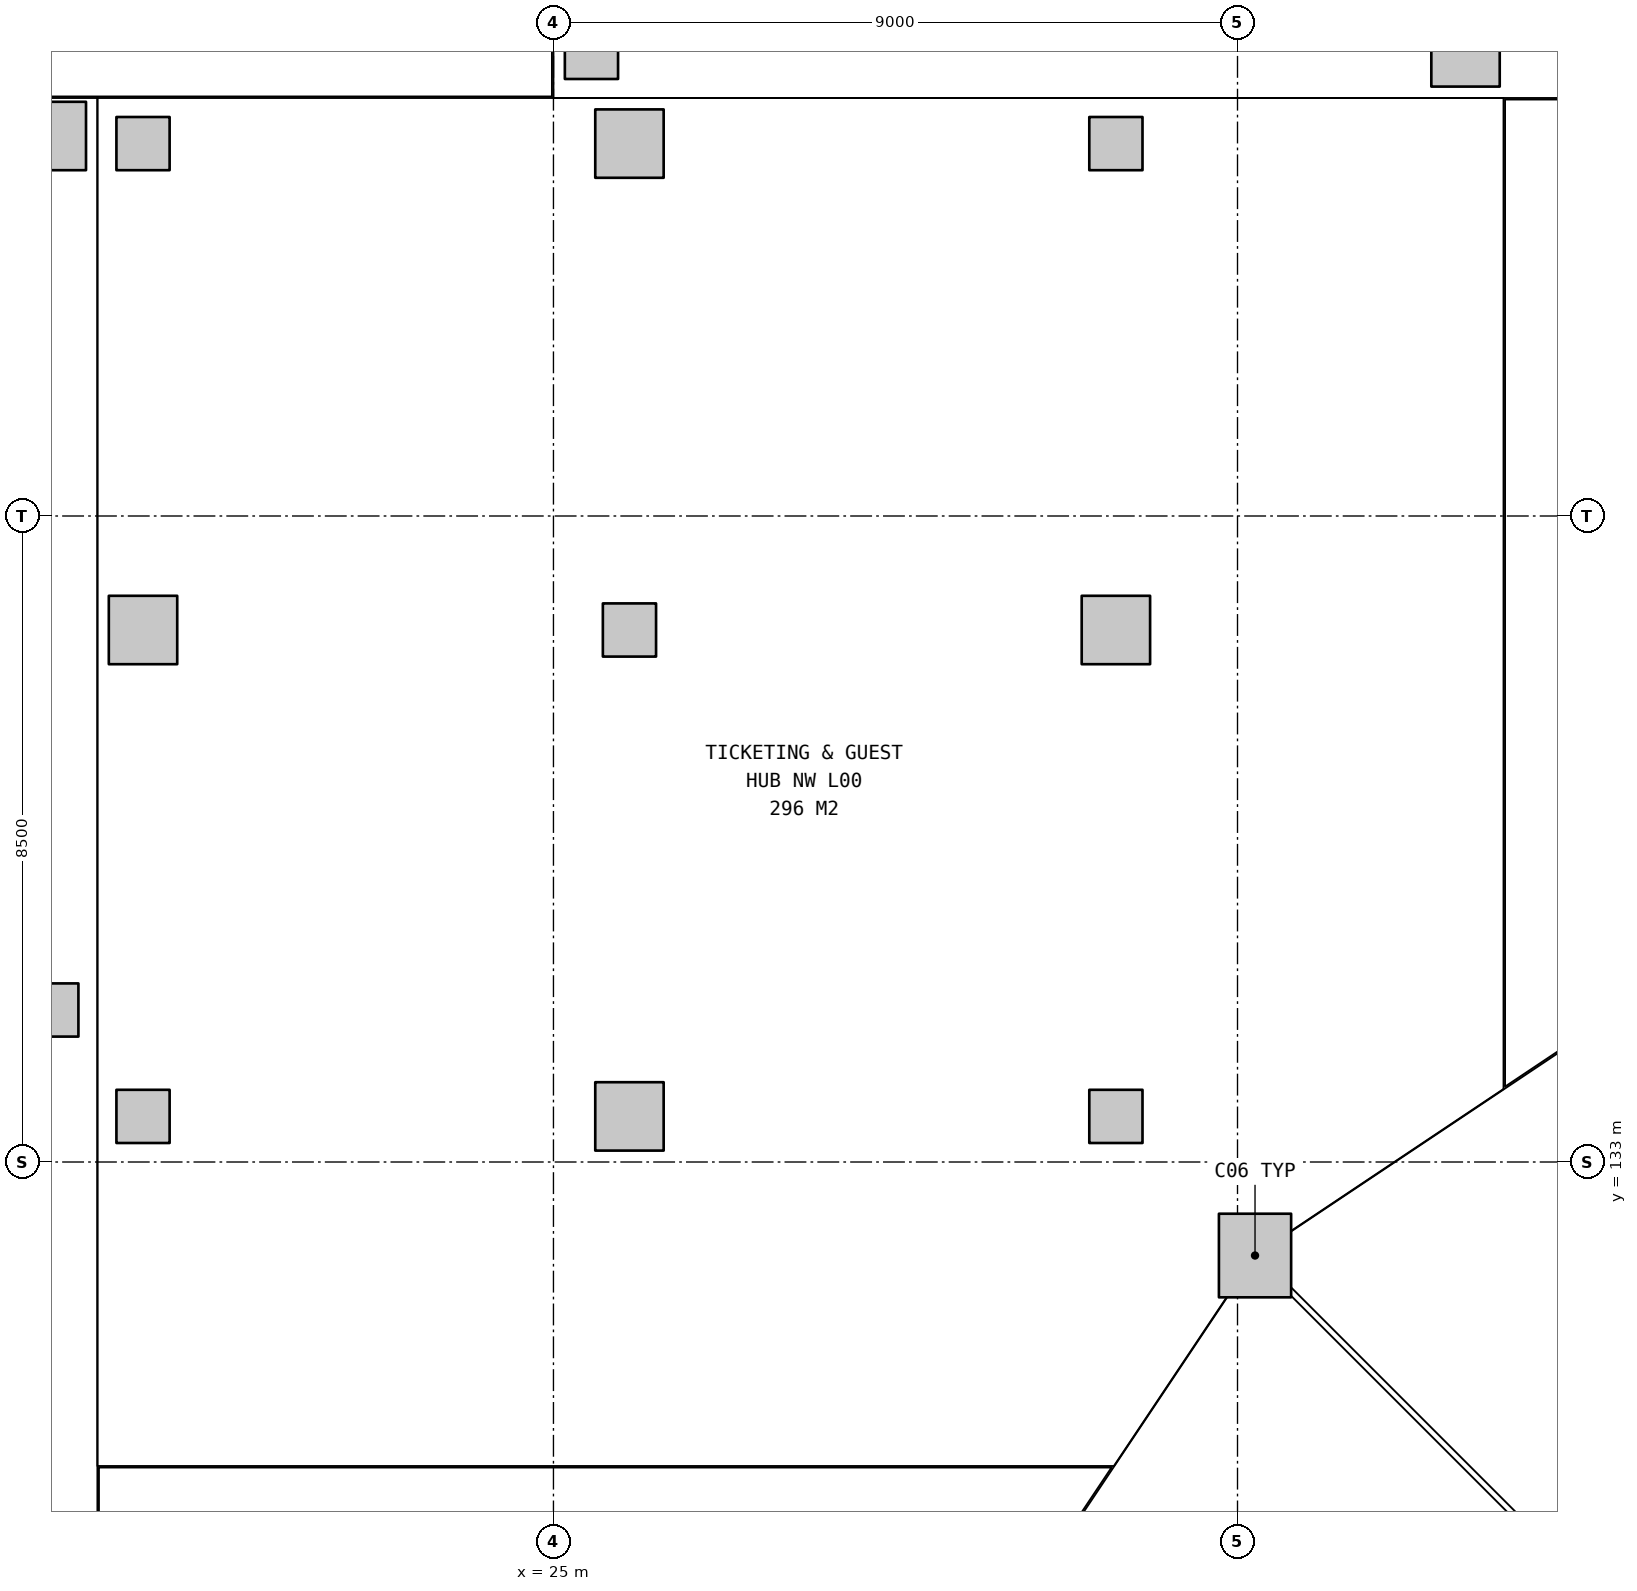
"""IFC4 building model, lengths in metres.
Left out: names, types, materials, properties, quantities, classifications, styles, units other than length and angle.
Written with IfcOpenShell. Run it as: python <this file> out.ifc"""

import sys

from ifc_helpers import new_model, si_unit, direction, frame, origin, origin_2d, place, context, subcontext, project, spatial, rectangle, extrude, element, save


model = new_model("IFC4")
c1 = context("Model", 3, precision=1e-05, world=origin(), true_north=direction((0.0, 1.0)))
c2 = subcontext(c1, "Body", "Model", "MODEL_VIEW")
j1 = project(units=[si_unit("LENGTHUNIT", "METRE"), si_unit("PLANEANGLEUNIT", "RADIAN")], contexts=[c1])
p1 = place(None, origin())
s1 = spatial("IfcSite", under=j1, at=p1, CompositionType="ELEMENT")
p2 = place(p1, origin())
s2 = spatial("IfcBuilding", under=s1, at=p2, CompositionType="ELEMENT")
p3 = place(p2, origin())
s3 = spatial("IfcBuildingStorey", under=s2, at=p3, CompositionType="ELEMENT", Elevation=0.0)
p4 = place(p3, frame((34.23, 131.77, 0.0), z_axis=(0.0, 0.0, 1.0), x_axis=(1.0, 0.0, 0.0)))
e1 = element("IfcColumn", 1, at=p4, inside=s3, PredefinedType="COLUMN", context=c2, shape_type="SweptSolid", body=[
    extrude(rectangle(XDim=0.95, YDim=1.1, at=origin_2d()), origin(), (0.0, 0.0, 1.0), 5.4),
])
p5 = place(p3, frame((18.4, 135.0, 0.0), z_axis=(0.0, 0.0, 1.0), x_axis=(1.0, 0.0, 0.0)))
e2 = element("IfcColumn", 2, at=p5, inside=s3, PredefinedType="COLUMN", context=c2, shape_type="SweptSolid", body=[
    extrude(rectangle(XDim=0.7, YDim=0.7, at=origin_2d()), origin(), (0.0, 0.0, 1.0), 5.4),
])
p6 = place(p3, frame((18.4, 146.5, 0.0), z_axis=(0.0, 0.0, 1.0), x_axis=(1.0, 0.0, 0.0)))
e3 = element("IfcColumn", 3, at=p6, inside=s3, PredefinedType="COLUMN", context=c2, shape_type="SweptSolid", body=[
    extrude(rectangle(XDim=0.9, YDim=0.9, at=origin_2d()), origin(), (0.0, 0.0, 1.0), 5.4),
])
p7 = place(p3, frame((25.5, 147.6, 0.0), z_axis=(0.0, 0.0, 1.0), x_axis=(1.0, 0.0, 0.0)))
e4 = element("IfcColumn", 4, at=p7, inside=s3, PredefinedType="COLUMN", context=c2, shape_type="SweptSolid", body=[
    extrude(rectangle(XDim=0.7, YDim=0.7, at=origin_2d()), origin(), (0.0, 0.0, 1.0), 5.4),
])
p8 = place(p3, frame((37.0, 147.6, 0.0), z_axis=(0.0, 0.0, 1.0), x_axis=(1.0, 0.0, 0.0)))
e5 = element("IfcColumn", 5, at=p8, inside=s3, PredefinedType="COLUMN", context=c2, shape_type="SweptSolid", body=[
    extrude(rectangle(XDim=0.9, YDim=0.9, at=origin_2d()), origin(), (0.0, 0.0, 1.0), 5.4),
])
p9 = place(p3, frame((19.6, 133.6, 0.0), z_axis=(0.0, 0.0, 1.0), x_axis=(1.0, 0.0, 0.0)))
e6 = element("IfcColumn", 6, at=p9, inside=s3, PredefinedType="COLUMN", context=c2, shape_type="SweptSolid", body=[
    extrude(rectangle(XDim=0.7, YDim=0.7, at=origin_2d()), origin(), (0.0, 0.0, 1.0), 5.4),
])
p10 = place(p3, frame((19.6, 140.0, 0.0), z_axis=(0.0, 0.0, 1.0), x_axis=(1.0, 0.0, 0.0)))
e7 = element("IfcColumn", 7, at=p10, inside=s3, PredefinedType="COLUMN", context=c2, shape_type="SweptSolid", body=[
    extrude(rectangle(XDim=0.9, YDim=0.9, at=origin_2d()), origin(), (0.0, 0.0, 1.0), 5.4),
])
p11 = place(p3, frame((19.6, 146.4, 0.0), z_axis=(0.0, 0.0, 1.0), x_axis=(1.0, 0.0, 0.0)))
e8 = element("IfcColumn", 8, at=p11, inside=s3, PredefinedType="COLUMN", context=c2, shape_type="SweptSolid", body=[
    extrude(rectangle(XDim=0.7, YDim=0.7, at=origin_2d()), origin(), (0.0, 0.0, 1.0), 5.4),
])
p12 = place(p3, frame((26.0, 133.6, 0.0), z_axis=(0.0, 0.0, 1.0), x_axis=(1.0, 0.0, 0.0)))
e9 = element("IfcColumn", 9, at=p12, inside=s3, PredefinedType="COLUMN", context=c2, shape_type="SweptSolid", body=[
    extrude(rectangle(XDim=0.9, YDim=0.9, at=origin_2d()), origin(), (0.0, 0.0, 1.0), 5.4),
])
p13 = place(p3, frame((26.0, 140.0, 0.0), z_axis=(0.0, 0.0, 1.0), x_axis=(1.0, 0.0, 0.0)))
e10 = element("IfcColumn", 10, at=p13, inside=s3, PredefinedType="COLUMN", context=c2, shape_type="SweptSolid", body=[
    extrude(rectangle(XDim=0.7, YDim=0.7, at=origin_2d()), origin(), (0.0, 0.0, 1.0), 5.4),
])
p14 = place(p3, frame((26.0, 146.4, 0.0), z_axis=(0.0, 0.0, 1.0), x_axis=(1.0, 0.0, 0.0)))
e11 = element("IfcColumn", 11, at=p14, inside=s3, PredefinedType="COLUMN", context=c2, shape_type="SweptSolid", body=[
    extrude(rectangle(XDim=0.9, YDim=0.9, at=origin_2d()), origin(), (0.0, 0.0, 1.0), 5.4),
])
p15 = place(p3, frame((32.4, 133.6, 0.0), z_axis=(0.0, 0.0, 1.0), x_axis=(1.0, 0.0, 0.0)))
e12 = element("IfcColumn", 12, at=p15, inside=s3, PredefinedType="COLUMN", context=c2, shape_type="SweptSolid", body=[
    extrude(rectangle(XDim=0.7, YDim=0.7, at=origin_2d()), origin(), (0.0, 0.0, 1.0), 5.4),
])
p16 = place(p3, frame((32.4, 140.0, 0.0), z_axis=(0.0, 0.0, 1.0), x_axis=(1.0, 0.0, 0.0)))
e13 = element("IfcColumn", 13, at=p16, inside=s3, PredefinedType="COLUMN", context=c2, shape_type="SweptSolid", body=[
    extrude(rectangle(XDim=0.9, YDim=0.9, at=origin_2d()), origin(), (0.0, 0.0, 1.0), 5.4),
])
p17 = place(p3, frame((32.4, 146.4, 0.0), z_axis=(0.0, 0.0, 1.0), x_axis=(1.0, 0.0, 0.0)))
e14 = element("IfcColumn", 14, at=p17, inside=s3, PredefinedType="COLUMN", context=c2, shape_type="SweptSolid", body=[
    extrude(rectangle(XDim=0.7, YDim=0.7, at=origin_2d()), origin(), (0.0, 0.0, 1.0), 5.4),
])
save(model, sys.argv[1])
